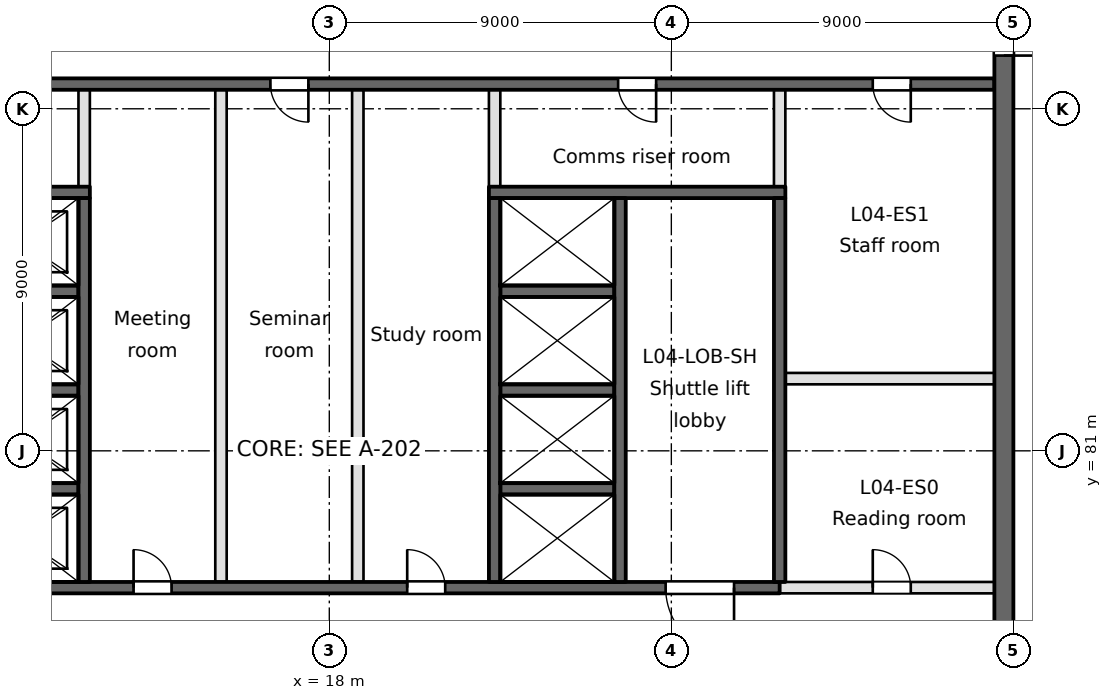
"""IFC4 building model, lengths in metres.
Left out: names, types, materials, properties, quantities, classifications, styles, units other than length and angle.
Written with IfcOpenShell. Run it as: python <this file> out.ifc"""

import sys

from ifc_helpers import new_model, si_unit, direction, frame, frame_2d, origin, place, context, subcontext, project, spatial, rectangle, extrude, element, fill, save


model = new_model("IFC4")
c1 = context("Model", 3, precision=1e-05, world=origin(), true_north=direction((0.0, 1.0)))
c2 = subcontext(c1, "Body", "Model", "MODEL_VIEW")
j1 = project(units=[si_unit("LENGTHUNIT", "METRE"), si_unit("PLANEANGLEUNIT", "RADIAN")], contexts=[c1])
p1 = place(None, origin())
s1 = spatial("IfcSite", under=j1, at=p1, CompositionType="ELEMENT")
p2 = place(p1, origin())
s2 = spatial("IfcBuilding", under=s1, at=p2, CompositionType="ELEMENT")
p3 = place(p2, frame((0.0, 0.0, 21.6)))
s3 = spatial("IfcBuildingStorey", under=s2, at=p3, CompositionType="ELEMENT", Elevation=21.6)
p4 = place(p3, frame((0.9, 77.4, -0.35), z_axis=(0.0, 0.0, 1.0), x_axis=(1.0, 0.0, 0.0)))
e1 = element("IfcWall", 1, at=p4, inside=s3, PredefinedType="SOLIDWALL", context=c2, shape_type="SweptSolid", body=[
    extrude(rectangle(XDim=28.95, YDim=0.3, at=frame_2d((14.475, 0.0))), origin(), (0.0, 0.0, 1.0), 4.8),
])
p5 = place(p4, frame((4.35, 0.0, 0.35)))
e2 = element("IfcOpeningElement", 2, at=p5, cuts=e1, PredefinedType="OPENING", context=c2, shape_type="SweptSolid", body=[
    extrude(rectangle(XDim=1.8, YDim=2.1, at=frame_2d((0.9, 1.05))), frame((0.0, 0.15, 0.0), z_axis=(0.0, -1.0, 0.0), x_axis=(1.0, 0.0, 0.0)), (0.0, 0.0, 1.0), 0.3),
])
p6 = place(p4, frame((25.95, 0.0, 0.35)))
e3 = element("IfcOpeningElement", 3, at=p6, cuts=e1, PredefinedType="OPENING", context=c2, shape_type="SweptSolid", body=[
    extrude(rectangle(XDim=1.8, YDim=2.1, at=frame_2d((0.9, 1.05))), frame((0.0, 0.15, 0.0), z_axis=(0.0, -1.0, 0.0), x_axis=(1.0, 0.0, 0.0)), (0.0, 0.0, 1.0), 0.3),
])
p7 = place(p4, frame((11.95, 0.0, 0.35)))
e4 = element("IfcOpeningElement", 4, at=p7, cuts=e1, PredefinedType="OPENING", context=c2, shape_type="SweptSolid", body=[
    extrude(rectangle(XDim=1.0, YDim=2.1, at=frame_2d((0.5, 1.05))), frame((0.0, 0.15, 0.0), z_axis=(0.0, -1.0, 0.0), x_axis=(1.0, 0.0, 0.0)), (0.0, 0.0, 1.0), 0.3),
])
p8 = place(p4, frame((19.15, 0.0, 0.35)))
e5 = element("IfcOpeningElement", 5, at=p8, cuts=e1, PredefinedType="OPENING", context=c2, shape_type="SweptSolid", body=[
    extrude(rectangle(XDim=1.0, YDim=2.1, at=frame_2d((0.5, 1.05))), frame((0.0, 0.15, 0.0), z_axis=(0.0, -1.0, 0.0), x_axis=(1.0, 0.0, 0.0)), (0.0, 0.0, 1.0), 0.3),
])
p9 = place(p3, frame((29.85, 77.4, 0.0), z_axis=(0.0, 0.0, 1.0), x_axis=(1.0, 0.0, 0.0)))
e6 = element("IfcWall", 6, at=p9, inside=s3, PredefinedType="PARTITIONING", context=c2, shape_type="SweptSolid", body=[
    extrude(rectangle(XDim=5.65, YDim=0.3, at=frame_2d((2.825, 0.0))), origin(), (0.0, 0.0, 1.0), 4.45),
])
p10 = place(p9, frame((2.45, 0.0, 0.0)))
e7 = element("IfcOpeningElement", 7, at=p10, cuts=e6, PredefinedType="OPENING", context=c2, shape_type="SweptSolid", body=[
    extrude(rectangle(XDim=1.0, YDim=2.1, at=frame_2d((0.5, 1.05))), frame((0.0, 0.15, 0.0), z_axis=(0.0, -1.0, 0.0), x_axis=(1.0, 0.0, 0.0)), (0.0, 0.0, 1.0), 0.3),
])
for number, where, z_axis, x_axis in (
    (8, (8.4, 80.0, -0.35), (0.0, 0.0, 1.0), (1.0, 0.0, 0.0)),
    (9, (22.5, 80.0, -0.35), (0.0, 0.0, 1.0), (1.0, 0.0, 0.0)),
    (10, (8.4, 82.6, -0.35), (0.0, 0.0, 1.0), (1.0, 0.0, 0.0)),
    (11, (22.5, 82.6, -0.35), (0.0, 0.0, 1.0), (1.0, 0.0, 0.0)),
):
    element("IfcWall", number, at=place(p3, frame(where, z_axis=z_axis, x_axis=x_axis)), inside=s3, PredefinedType="SOLIDWALL", context=c2, shape_type="SweptSolid", body=[
        extrude(rectangle(XDim=3.0, YDim=0.3, at=frame_2d((1.5, 0.0))), origin(), (0.0, 0.0, 1.0), 4.8),
    ])
p11 = place(p3, frame((30.0, 82.9, 0.0), z_axis=(0.0, 0.0, 1.0), x_axis=(1.0, 0.0, 0.0)))
e12 = element("IfcWall", 12, at=p11, inside=s3, PredefinedType="PARTITIONING", context=c2, shape_type="SweptSolid", body=[
    extrude(rectangle(XDim=5.5, YDim=0.3, at=frame_2d((2.75, 0.0))), origin(), (0.0, 0.0, 1.0), 4.45),
])
for number, where, z_axis, x_axis in (
    (13, (8.4, 85.2, -0.35), (0.0, 0.0, 1.0), (1.0, 0.0, 0.0)),
    (14, (22.5, 85.2, -0.35), (0.0, 0.0, 1.0), (1.0, 0.0, 0.0)),
):
    element("IfcWall", number, at=place(p3, frame(where, z_axis=z_axis, x_axis=x_axis)), inside=s3, PredefinedType="SOLIDWALL", context=c2, shape_type="SweptSolid", body=[
        extrude(rectangle(XDim=3.0, YDim=0.3, at=frame_2d((1.5, 0.0))), origin(), (0.0, 0.0, 1.0), 4.8),
    ])
p12 = place(p3, frame((0.9, 87.8, -0.35), z_axis=(0.0, 0.0, 1.0), x_axis=(1.0, 0.0, 0.0)))
e15 = element("IfcWall", 15, at=p12, inside=s3, PredefinedType="SOLIDWALL", context=c2, shape_type="SweptSolid", body=[
    extrude(rectangle(XDim=10.8, YDim=0.3, at=frame_2d((5.4, 0.0))), origin(), (0.0, 0.0, 1.0), 4.8),
])
p13 = place(p3, frame((22.2, 87.8, -0.35), z_axis=(0.0, 0.0, 1.0), x_axis=(1.0, 0.0, 0.0)))
e16 = element("IfcWall", 16, at=p13, inside=s3, PredefinedType="SOLIDWALL", context=c2, shape_type="SweptSolid", body=[
    extrude(rectangle(XDim=7.8, YDim=0.3, at=frame_2d((3.9, 0.0))), origin(), (0.0, 0.0, 1.0), 4.8),
])
p14 = place(p3, frame((0.9, 90.65, -0.35), z_axis=(0.0, 0.0, 1.0), x_axis=(1.0, 0.0, 0.0)))
e17 = element("IfcWall", 17, at=p14, inside=s3, PredefinedType="SOLIDWALL", context=c2, shape_type="SweptSolid", body=[
    extrude(rectangle(XDim=34.6, YDim=0.3, at=frame_2d((17.3, 0.0))), origin(), (0.0, 0.0, 1.0), 4.8),
])
p15 = place(p14, frame((4.75, 0.0, 0.35)))
e18 = element("IfcOpeningElement", 18, at=p15, cuts=e17, PredefinedType="OPENING", context=c2, shape_type="SweptSolid", body=[
    extrude(rectangle(XDim=1.0, YDim=2.1, at=frame_2d((0.5, 1.05))), frame((0.0, 0.15, 0.0), z_axis=(0.0, -1.0, 0.0), x_axis=(1.0, 0.0, 0.0)), (0.0, 0.0, 1.0), 0.3),
])
p16 = place(p14, frame((24.7, 0.0, 0.35)))
e19 = element("IfcOpeningElement", 19, at=p16, cuts=e17, PredefinedType="OPENING", context=c2, shape_type="SweptSolid", body=[
    extrude(rectangle(XDim=1.0, YDim=2.1, at=frame_2d((0.5, 1.05))), frame((0.0, 0.15, 0.0), z_axis=(0.0, -1.0, 0.0), x_axis=(1.0, 0.0, 0.0)), (0.0, 0.0, 1.0), 0.3),
])
p17 = place(p14, frame((15.55, 0.0, 0.35)))
e20 = element("IfcOpeningElement", 20, at=p17, cuts=e17, PredefinedType="OPENING", context=c2, shape_type="SweptSolid", body=[
    extrude(rectangle(XDim=1.0, YDim=2.1, at=frame_2d((0.5, 1.05))), frame((0.0, 0.15, 0.0), z_axis=(0.0, -1.0, 0.0), x_axis=(1.0, 0.0, 0.0)), (0.0, 0.0, 1.0), 0.3),
])
p18 = place(p14, frame((31.4, 0.0, 0.35)))
e21 = element("IfcOpeningElement", 21, at=p18, cuts=e17, PredefinedType="OPENING", context=c2, shape_type="SweptSolid", body=[
    extrude(rectangle(XDim=1.0, YDim=2.1, at=frame_2d((0.5, 1.05))), frame((0.0, 0.15, 0.0), z_axis=(0.0, -1.0, 0.0), x_axis=(1.0, 0.0, 0.0)), (0.0, 0.0, 1.0), 0.3),
])
p19 = place(p3, frame((11.55, 77.55, -0.35), z_axis=(0.0, 0.0, 1.0), x_axis=(0.0, 1.0, 0.0)))
e22 = element("IfcWall", 22, at=p19, inside=s3, PredefinedType="SOLIDWALL", context=c2, shape_type="SweptSolid", body=[
    extrude(rectangle(XDim=10.1, YDim=0.3, at=frame_2d((5.05, 0.0))), origin(), (0.0, 0.0, 1.0), 4.8),
])
p20 = place(p3, frame((11.55, 87.95, 0.0), z_axis=(0.0, 0.0, 1.0), x_axis=(0.0, 1.0, 0.0)))
e23 = element("IfcWall", 23, at=p20, inside=s3, PredefinedType="PARTITIONING", context=c2, shape_type="SweptSolid", body=[
    extrude(rectangle(XDim=2.55, YDim=0.3, at=frame_2d((1.275, 0.0))), origin(), (0.0, 0.0, 1.0), 4.45),
])
for number, where, z_axis, x_axis in (
    (24, (15.15, 77.55, 0.0), (0.0, 0.0, 1.0), (0.0, 1.0, 0.0)),
    (25, (18.75, 77.55, 0.0), (0.0, 0.0, 1.0), (0.0, 1.0, 0.0)),
):
    element("IfcWall", number, at=place(p3, frame(where, z_axis=z_axis, x_axis=x_axis)), inside=s3, PredefinedType="PARTITIONING", context=c2, shape_type="SweptSolid", body=[
        extrude(rectangle(XDim=12.95, YDim=0.3, at=frame_2d((6.475, 0.0))), origin(), (0.0, 0.0, 1.0), 4.45),
    ])
p21 = place(p3, frame((22.35, 77.55, -0.35), z_axis=(0.0, 0.0, 1.0), x_axis=(0.0, 1.0, 0.0)))
e26 = element("IfcWall", 26, at=p21, inside=s3, PredefinedType="SOLIDWALL", context=c2, shape_type="SweptSolid", body=[
    extrude(rectangle(XDim=10.1, YDim=0.3, at=frame_2d((5.05, 0.0))), origin(), (0.0, 0.0, 1.0), 4.8),
])
p22 = place(p3, frame((22.35, 87.95, 0.0), z_axis=(0.0, 0.0, 1.0), x_axis=(0.0, 1.0, 0.0)))
e27 = element("IfcWall", 27, at=p22, inside=s3, PredefinedType="PARTITIONING", context=c2, shape_type="SweptSolid", body=[
    extrude(rectangle(XDim=2.55, YDim=0.3, at=frame_2d((1.275, 0.0))), origin(), (0.0, 0.0, 1.0), 4.45),
])
for number, where, z_axis, x_axis in (
    (28, (25.65, 77.55, -0.35), (0.0, 0.0, 1.0), (0.0, 1.0, 0.0)),
    (29, (29.85, 77.55, -0.35), (0.0, 0.0, 1.0), (0.0, 1.0, 0.0)),
):
    element("IfcWall", number, at=place(p3, frame(where, z_axis=z_axis, x_axis=x_axis)), inside=s3, PredefinedType="SOLIDWALL", context=c2, shape_type="SweptSolid", body=[
        extrude(rectangle(XDim=10.1, YDim=0.3, at=frame_2d((5.05, 0.0))), origin(), (0.0, 0.0, 1.0), 4.8),
    ])
p23 = place(p3, frame((29.85, 87.95, 0.0), z_axis=(0.0, 0.0, 1.0), x_axis=(0.0, 1.0, 0.0)))
e30 = element("IfcWall", 30, at=p23, inside=s3, PredefinedType="PARTITIONING", context=c2, shape_type="SweptSolid", body=[
    extrude(rectangle(XDim=2.55, YDim=0.3, at=frame_2d((1.275, 0.0))), origin(), (0.0, 0.0, 1.0), 4.45),
])
p24 = place(p3, frame((35.75, 63.5, -0.35), z_axis=(0.0, 0.0, 1.0), x_axis=(0.0, 1.0, 0.0)))
e31 = element("IfcWall", 31, at=p24, inside=s3, PredefinedType="SOLIDWALL", context=c2, shape_type="SweptSolid", body=[
    extrude(rectangle(XDim=34.6, YDim=0.5, at=frame_2d((17.3, 0.0))), origin(), (0.0, 0.0, 1.0), 4.8),
])
p25 = place(p24, frame((9.7, 0.0, 0.35)))
e32 = element("IfcOpeningElement", 32, at=p25, cuts=e31, PredefinedType="OPENING", context=c2, shape_type="SweptSolid", body=[
    extrude(rectangle(XDim=2.4, YDim=2.1, at=frame_2d((1.2, 1.05))), frame((0.0, 0.25, 0.0), z_axis=(0.0, -1.0, 0.0), x_axis=(1.0, 0.0, 0.0)), (0.0, 0.0, 1.0), 0.5),
])
p26 = place(p24, frame((27.9, 0.0, 0.35)))
e33 = element("IfcOpeningElement", 33, at=p26, cuts=e31, PredefinedType="OPENING", context=c2, shape_type="SweptSolid", body=[
    extrude(rectangle(XDim=1.5, YDim=2.1, at=frame_2d((0.75, 1.05))), frame((0.0, 0.25, 0.0), z_axis=(0.0, -1.0, 0.0), x_axis=(1.0, 0.0, 0.0)), (0.0, 0.0, 1.0), 0.5),
])
p27 = place(p24, frame((1.5, 0.0, 0.35)))
e34 = element("IfcOpeningElement", 34, at=p27, cuts=e31, PredefinedType="OPENING", context=c2, shape_type="SweptSolid", body=[
    extrude(rectangle(XDim=1.2, YDim=2.1, at=frame_2d((0.6, 1.05))), frame((0.0, 0.25, 0.0), z_axis=(0.0, -1.0, 0.0), x_axis=(1.0, 0.0, 0.0)), (0.0, 0.0, 1.0), 0.5),
])
p28 = place(p6, frame((1.8, 0.0, 0.0), z_axis=(0.0, 0.0, 1.0), x_axis=(-1.0, 0.0, 0.0)))
e35 = element("IfcDoor", 35, at=p28, inside=s3, OperationType="SINGLE_SWING_LEFT", PredefinedType="DOOR", context=c2, shape_type="SweptSolid", body=[
    extrude(rectangle(XDim=1.8, YDim=2.1, at=frame_2d((0.9, 1.05))), frame((0.0, 0.025, 0.0), z_axis=(0.0, -1.0, 0.0), x_axis=(1.0, 0.0, 0.0)), (0.0, 0.0, 1.0), 0.05),
])
fill(e3, e35)
p29 = place(p26, frame((1.5, 0.0, 0.0), z_axis=(0.0, 0.0, 1.0), x_axis=(-1.0, 0.0, 0.0)))
e36 = element("IfcDoor", 36, at=p29, inside=s3, OperationType="SINGLE_SWING_RIGHT", PredefinedType="DOOR", context=c2, shape_type="SweptSolid", body=[
    extrude(rectangle(XDim=1.5, YDim=2.1, at=frame_2d((0.75, 1.05))), frame((0.0, 0.025, 0.0), z_axis=(0.0, -1.0, 0.0), x_axis=(1.0, 0.0, 0.0)), (0.0, 0.0, 1.0), 0.05),
])
fill(e33, e36)
p30 = place(p16, frame((1.0, 0.0, 0.0), z_axis=(0.0, 0.0, 1.0), x_axis=(-1.0, 0.0, 0.0)))
e37 = element("IfcDoor", 37, at=p30, inside=s3, OperationType="SINGLE_SWING_LEFT", PredefinedType="DOOR", context=c2, shape_type="SweptSolid", body=[
    extrude(rectangle(XDim=1.0, YDim=2.1, at=frame_2d((0.5, 1.05))), frame((0.0, 0.025, 0.0), z_axis=(0.0, -1.0, 0.0), x_axis=(1.0, 0.0, 0.0)), (0.0, 0.0, 1.0), 0.05),
])
fill(e19, e37)
p31 = place(p7, origin())
e38 = element("IfcDoor", 38, at=p31, inside=s3, OperationType="SINGLE_SWING_LEFT", PredefinedType="DOOR", context=c2, shape_type="SweptSolid", body=[
    extrude(rectangle(XDim=1.0, YDim=2.1, at=frame_2d((0.5, 1.05))), frame((0.0, 0.025, 0.0), z_axis=(0.0, -1.0, 0.0), x_axis=(1.0, 0.0, 0.0)), (0.0, 0.0, 1.0), 0.05),
])
fill(e4, e38)
p32 = place(p17, frame((1.0, 0.0, 0.0), z_axis=(0.0, 0.0, 1.0), x_axis=(-1.0, 0.0, 0.0)))
e39 = element("IfcDoor", 39, at=p32, inside=s3, OperationType="SINGLE_SWING_LEFT", PredefinedType="DOOR", context=c2, shape_type="SweptSolid", body=[
    extrude(rectangle(XDim=1.0, YDim=2.1, at=frame_2d((0.5, 1.05))), frame((0.0, 0.025, 0.0), z_axis=(0.0, -1.0, 0.0), x_axis=(1.0, 0.0, 0.0)), (0.0, 0.0, 1.0), 0.05),
])
fill(e20, e39)
p33 = place(p8, origin())
e40 = element("IfcDoor", 40, at=p33, inside=s3, OperationType="SINGLE_SWING_LEFT", PredefinedType="DOOR", context=c2, shape_type="SweptSolid", body=[
    extrude(rectangle(XDim=1.0, YDim=2.1, at=frame_2d((0.5, 1.05))), frame((0.0, 0.025, 0.0), z_axis=(0.0, -1.0, 0.0), x_axis=(1.0, 0.0, 0.0)), (0.0, 0.0, 1.0), 0.05),
])
fill(e5, e40)
p34 = place(p10, origin())
e41 = element("IfcDoor", 41, at=p34, inside=s3, OperationType="SINGLE_SWING_LEFT", PredefinedType="DOOR", context=c2, shape_type="SweptSolid", body=[
    extrude(rectangle(XDim=1.0, YDim=2.1, at=frame_2d((0.5, 1.05))), frame((0.0, 0.025, 0.0), z_axis=(0.0, -1.0, 0.0), x_axis=(1.0, 0.0, 0.0)), (0.0, 0.0, 1.0), 0.05),
])
fill(e7, e41)
p35 = place(p18, frame((1.0, 0.0, 0.0), z_axis=(0.0, 0.0, 1.0), x_axis=(-1.0, 0.0, 0.0)))
e42 = element("IfcDoor", 42, at=p35, inside=s3, OperationType="SINGLE_SWING_LEFT", PredefinedType="DOOR", context=c2, shape_type="SweptSolid", body=[
    extrude(rectangle(XDim=1.0, YDim=2.1, at=frame_2d((0.5, 1.05))), frame((0.0, 0.025, 0.0), z_axis=(0.0, -1.0, 0.0), x_axis=(1.0, 0.0, 0.0)), (0.0, 0.0, 1.0), 0.05),
])
fill(e21, e42)
save(model, sys.argv[1])
